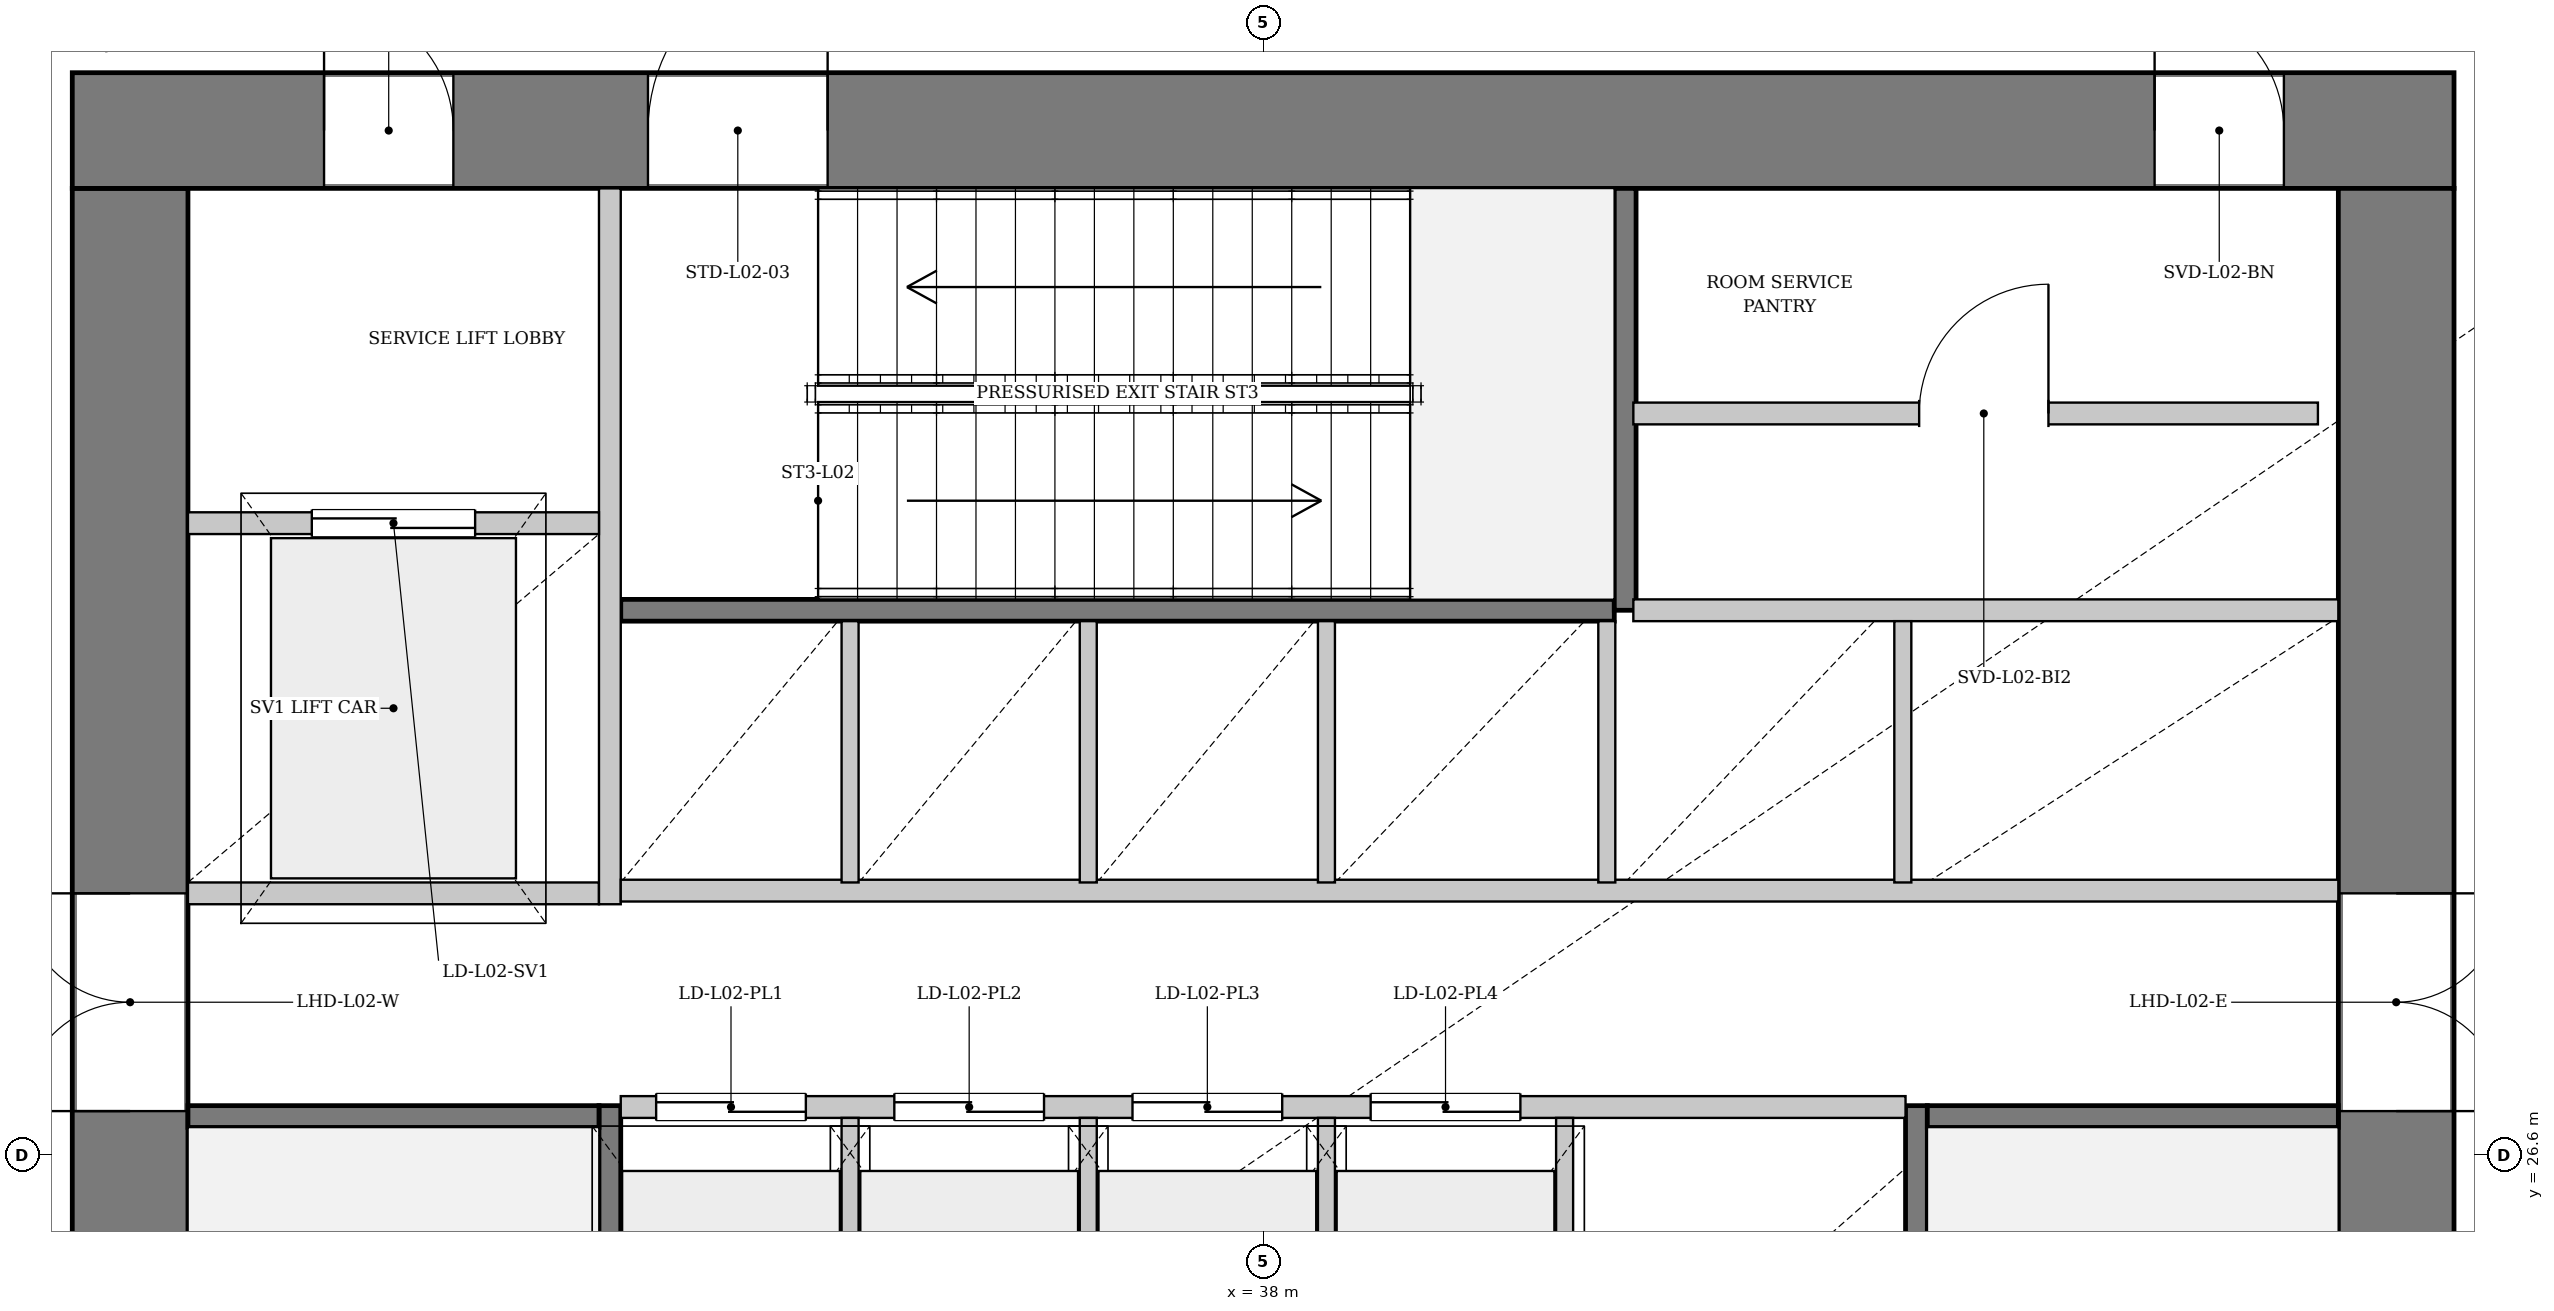
"""IFC4 building model, lengths in metres.
Left out: names, types, materials, properties, quantities, classifications, styles, units other than length and angle.
Written with IfcOpenShell. Run it as: python <this file> out.ifc"""

import sys

from ifc_helpers import new_model, si_unit, direction, frame, frame_2d, origin, place, context, subcontext, project, spatial, rectangle, extrude, source, transform, mapped, element, fill, save


model = new_model("IFC4")
c1 = context("Model", 3, precision=1e-05, world=origin(), true_north=direction((0.0, 1.0)))
c2 = subcontext(c1, "Body", "Model", "MODEL_VIEW")
j1 = project(units=[si_unit("LENGTHUNIT", "METRE"), si_unit("PLANEANGLEUNIT", "RADIAN")], contexts=[c1])
p1 = place(None, origin())
s1 = spatial("IfcSite", under=j1, at=p1, CompositionType="ELEMENT")
p2 = place(p1, origin())
s2 = spatial("IfcBuilding", under=s1, at=p2, CompositionType="ELEMENT")
p3 = place(p2, frame((0.0, 0.0, 10.2)))
s3 = spatial("IfcBuildingStorey", under=s2, at=p3, CompositionType="ELEMENT", Elevation=10.2)
p4 = place(p3, frame((29.675, 19.5, 0.0), z_axis=(0.0, 0.0, 1.0), x_axis=(0.0, 1.0, 0.0)))
e1 = element("IfcWall", 1, at=p4, inside=s3, PredefinedType="SHEAR", context=c2, shape_type="SweptSolid", body=[
    extrude(rectangle(XDim=14.2, YDim=0.85, at=frame_2d((7.1, 0.0))), origin(), (0.0, 0.0, 1.0), 5.08),
])
p5 = place(p4, frame((7.42, 0.0, 0.0)))
e2 = element("IfcOpeningElement", 2, at=p5, cuts=e1, PredefinedType="OPENING", context=c2, shape_type="SweptSolid", body=[
    extrude(rectangle(XDim=1.6, YDim=2.2, at=frame_2d((0.8, 1.1))), frame((0.0, 0.435, 0.0), z_axis=(0.0, -1.0, 0.0), x_axis=(1.0, 0.0, 0.0)), (0.0, 0.0, 1.0), 0.87),
])
p6 = place(p3, frame((29.25, 34.125, 0.0), z_axis=(0.0, 0.0, 1.0), x_axis=(1.0, 0.0, 0.0)))
e3 = element("IfcWall", 3, at=p6, inside=s3, PredefinedType="SHEAR", context=c2, shape_type="SweptSolid", body=[
    extrude(rectangle(XDim=17.5, YDim=0.85, at=frame_2d((8.75, 0.0))), origin(), (0.0, 0.0, 1.0), 5.08),
])
p7 = place(p6, frame((1.85, 0.0, 0.0)))
e4 = element("IfcOpeningElement", 4, at=p7, cuts=e3, PredefinedType="OPENING", context=c2, shape_type="SweptSolid", body=[
    extrude(rectangle(XDim=0.95, YDim=2.1, at=frame_2d((0.475, 1.05))), frame((0.0, 0.435, 0.0), z_axis=(0.0, -1.0, 0.0), x_axis=(1.0, 0.0, 0.0)), (0.0, 0.0, 1.0), 0.87),
])
p8 = place(p6, frame((4.23, 0.0, 0.0)))
e5 = element("IfcOpeningElement", 5, at=p8, cuts=e3, PredefinedType="OPENING", context=c2, shape_type="SweptSolid", body=[
    extrude(rectangle(XDim=1.32, YDim=2.2, at=frame_2d((0.66, 1.1))), frame((0.0, 0.435, 0.0), z_axis=(0.0, -1.0, 0.0), x_axis=(1.0, 0.0, 0.0)), (0.0, 0.0, 1.0), 0.87),
])
p9 = place(p6, frame((15.3, 0.0, 0.0)))
e6 = element("IfcOpeningElement", 6, at=p9, cuts=e3, PredefinedType="OPENING", context=c2, shape_type="SweptSolid", body=[
    extrude(rectangle(XDim=0.95, YDim=2.1, at=frame_2d((0.475, 1.05))), frame((0.0, 0.435, 0.0), z_axis=(0.0, -1.0, 0.0), x_axis=(1.0, 0.0, 0.0)), (0.0, 0.0, 1.0), 0.87),
])
p10 = place(p3, frame((46.325, 33.7, 0.0), z_axis=(0.0, 0.0, 1.0), x_axis=(0.0, -1.0, 0.0)))
e7 = element("IfcWall", 7, at=p10, inside=s3, PredefinedType="SHEAR", context=c2, shape_type="SweptSolid", body=[
    extrude(rectangle(XDim=14.2, YDim=0.85, at=frame_2d((7.1, 0.0))), origin(), (0.0, 0.0, 1.0), 5.08),
])
p11 = place(p10, frame((5.18, 0.0, 0.0)))
e8 = element("IfcOpeningElement", 8, at=p11, cuts=e7, PredefinedType="OPENING", context=c2, shape_type="SweptSolid", body=[
    extrude(rectangle(XDim=1.6, YDim=2.2, at=frame_2d((0.8, 1.1))), frame((0.0, 0.435, 0.0), z_axis=(0.0, -1.0, 0.0), x_axis=(1.0, 0.0, 0.0)), (0.0, 0.0, 1.0), 0.87),
])
p12 = place(p3, frame((33.2, 19.5, 0.0), z_axis=(0.0, 0.0, 1.0), x_axis=(0.0, 1.0, 0.0)))
e9 = element("IfcWall", 9, at=p12, inside=s3, PredefinedType="PARTITIONING", context=c2, shape_type="SweptSolid", body=[
    extrude(rectangle(XDim=7.46, YDim=0.16, at=frame_2d((3.73, 0.0))), origin(), (0.0, 0.0, 1.0), 5.08),
])
p13 = place(p12, frame((0.08, 0.0, 0.0)))
e10 = element("IfcOpeningElement", 10, at=p13, cuts=e9, PredefinedType="OPENING", context=c2, shape_type="SweptSolid", body=[
    extrude(rectangle(XDim=1.32, YDim=2.2, at=frame_2d((0.66, 1.1))), frame((0.0, 0.09, 0.0), z_axis=(0.0, -1.0, 0.0), x_axis=(1.0, 0.0, 0.0)), (0.0, 0.0, 1.0), 0.18),
])
p14 = place(p3, frame((30.1, 26.88, 0.0), z_axis=(0.0, 0.0, 1.0), x_axis=(1.0, 0.0, 0.0)))
e11 = element("IfcWall", 11, at=p14, inside=s3, PredefinedType="PARTITIONING", context=c2, shape_type="SweptSolid", body=[
    extrude(rectangle(XDim=3.02, YDim=0.16, at=frame_2d((1.51, 0.0))), origin(), (0.0, 0.0, 1.0), 5.08),
])
p15 = place(p3, frame((42.8, 26.96, 0.0), z_axis=(0.0, 0.0, 1.0), x_axis=(0.0, -1.0, 0.0)))
e12 = element("IfcWall", 12, at=p15, inside=s3, PredefinedType="PARTITIONING", context=c2, shape_type="SweptSolid", body=[
    extrude(rectangle(XDim=7.46, YDim=0.16, at=frame_2d((3.73, 0.0))), origin(), (0.0, 0.0, 1.0), 5.08),
])
p16 = place(p15, frame((6.06, 0.0, 0.0)))
e13 = element("IfcOpeningElement", 13, at=p16, cuts=e12, PredefinedType="OPENING", context=c2, shape_type="SweptSolid", body=[
    extrude(rectangle(XDim=1.32, YDim=2.2, at=frame_2d((0.66, 1.1))), frame((0.0, 0.09, 0.0), z_axis=(0.0, -1.0, 0.0), x_axis=(1.0, 0.0, 0.0)), (0.0, 0.0, 1.0), 0.18),
])
p17 = place(p3, frame((42.88, 26.88, 0.0), z_axis=(0.0, 0.0, 1.0), x_axis=(1.0, 0.0, 0.0)))
e14 = element("IfcWall", 14, at=p17, inside=s3, PredefinedType="PARTITIONING", context=c2, shape_type="SweptSolid", body=[
    extrude(rectangle(XDim=3.02, YDim=0.16, at=frame_2d((1.51, 0.0))), origin(), (0.0, 0.0, 1.0), 5.08),
])
p18 = place(p3, frame((33.28, 30.6, 0.0), z_axis=(0.0, 0.0, 1.0), x_axis=(1.0, 0.0, 0.0)))
e15 = element("IfcWall", 15, at=p18, inside=s3, PredefinedType="PARTITIONING", context=c2, shape_type="SweptSolid", body=[
    extrude(rectangle(XDim=7.3, YDim=0.16, at=frame_2d((3.65, 0.0))), origin(), (0.0, 0.0, 1.0), 5.08),
])
p19 = place(p3, frame((40.66, 30.6, 0.0), z_axis=(0.0, 0.0, 1.0), x_axis=(0.0, 1.0, 0.0)))
e16 = element("IfcWall", 16, at=p19, inside=s3, PredefinedType="PARTITIONING", context=c2, shape_type="SweptSolid", body=[
    extrude(rectangle(XDim=3.1, YDim=0.16, at=frame_2d((1.55, 0.0))), origin(), (0.0, 0.0, 1.0), 5.08),
])
p20 = place(p3, frame((30.1, 28.52, 0.0), z_axis=(0.0, 0.0, 1.0), x_axis=(1.0, 0.0, 0.0)))
e17 = element("IfcWall", 17, at=p20, inside=s3, PredefinedType="PARTITIONING", context=c2, shape_type="SweptSolid", body=[
    extrude(rectangle(XDim=3.02, YDim=0.16, at=frame_2d((1.51, 0.0))), origin(), (0.0, 0.0, 1.0), 5.08),
])
p21 = place(p3, frame((33.2, 28.44, 0.0), z_axis=(0.0, 0.0, 1.0), x_axis=(0.0, 1.0, 0.0)))
e18 = element("IfcWall", 18, at=p21, inside=s3, PredefinedType="PARTITIONING", context=c2, shape_type="SweptSolid", body=[
    extrude(rectangle(XDim=5.26, YDim=0.16, at=frame_2d((2.63, 0.0))), origin(), (0.0, 0.0, 1.0), 5.08),
])
p22 = place(p3, frame((30.1, 31.24, 0.0), z_axis=(0.0, 0.0, 1.0), x_axis=(1.0, 0.0, 0.0)))
e19 = element("IfcWall", 19, at=p22, inside=s3, PredefinedType="PARTITIONING", context=c2, shape_type="SweptSolid", body=[
    extrude(rectangle(XDim=3.02, YDim=0.16, at=frame_2d((1.51, 0.0))), origin(), (0.0, 0.0, 1.0), 5.08),
])
p23 = place(p22, frame((0.91, 0.0, 0.0)))
e20 = element("IfcOpeningElement", 20, at=p23, cuts=e19, PredefinedType="OPENING", context=c2, shape_type="SweptSolid", body=[
    extrude(rectangle(XDim=1.2, YDim=2.2, at=frame_2d((0.6, 1.1))), frame((0.0, 0.09, 0.0), z_axis=(0.0, -1.0, 0.0), x_axis=(1.0, 0.0, 0.0)), (0.0, 0.0, 1.0), 0.18),
])
p24 = place(p3, frame((33.28, 26.95, 0.0), z_axis=(0.0, 0.0, 1.0), x_axis=(1.0, 0.0, 0.0)))
e21 = element("IfcWall", 21, at=p24, inside=s3, PredefinedType="PARTITIONING", context=c2, shape_type="SweptSolid", body=[
    extrude(rectangle(XDim=9.44, YDim=0.16, at=frame_2d((4.72, 0.0))), origin(), (0.0, 0.0, 1.0), 5.08),
])
p25 = place(p24, frame((0.26, 0.0, 0.0)))
e22 = element("IfcOpeningElement", 22, at=p25, cuts=e21, PredefinedType="OPENING", context=c2, shape_type="SweptSolid", body=[
    extrude(rectangle(XDim=1.1, YDim=2.2, at=frame_2d((0.55, 1.1))), frame((0.0, 0.09, 0.0), z_axis=(0.0, -1.0, 0.0), x_axis=(1.0, 0.0, 0.0)), (0.0, 0.0, 1.0), 0.18),
])
p26 = place(p24, frame((2.01, 0.0, 0.0)))
e23 = element("IfcOpeningElement", 23, at=p26, cuts=e21, PredefinedType="OPENING", context=c2, shape_type="SweptSolid", body=[
    extrude(rectangle(XDim=1.1, YDim=2.2, at=frame_2d((0.55, 1.1))), frame((0.0, 0.09, 0.0), z_axis=(0.0, -1.0, 0.0), x_axis=(1.0, 0.0, 0.0)), (0.0, 0.0, 1.0), 0.18),
])
p27 = place(p24, frame((3.76, 0.0, 0.0)))
e24 = element("IfcOpeningElement", 24, at=p27, cuts=e21, PredefinedType="OPENING", context=c2, shape_type="SweptSolid", body=[
    extrude(rectangle(XDim=1.1, YDim=2.2, at=frame_2d((0.55, 1.1))), frame((0.0, 0.09, 0.0), z_axis=(0.0, -1.0, 0.0), x_axis=(1.0, 0.0, 0.0)), (0.0, 0.0, 1.0), 0.18),
])
p28 = place(p24, frame((5.51, 0.0, 0.0)))
e25 = element("IfcOpeningElement", 25, at=p28, cuts=e21, PredefinedType="OPENING", context=c2, shape_type="SweptSolid", body=[
    extrude(rectangle(XDim=1.1, YDim=2.2, at=frame_2d((0.55, 1.1))), frame((0.0, 0.09, 0.0), z_axis=(0.0, -1.0, 0.0), x_axis=(1.0, 0.0, 0.0)), (0.0, 0.0, 1.0), 0.18),
])
for number, where, z_axis, x_axis in (
    (26, (34.965, 24.56, 0.0), (0.0, 0.0, 1.0), (0.0, 1.0, 0.0)),
    (27, (36.715, 24.56, 0.0), (0.0, 0.0, 1.0), (0.0, 1.0, 0.0)),
    (28, (38.465, 24.56, 0.0), (0.0, 0.0, 1.0), (0.0, 1.0, 0.0)),
    (29, (40.215, 24.56, 0.0), (0.0, 0.0, 1.0), (0.0, 1.0, 0.0)),
):
    element("IfcWall", number, at=place(p3, frame(where, z_axis=z_axis, x_axis=x_axis)), inside=s3, PredefinedType="PARTITIONING", context=c2, shape_type="SweptSolid", body=[
        extrude(rectangle(XDim=2.31, YDim=0.125, at=frame_2d((1.155, 0.0))), origin(), (0.0, 0.0, 1.0), 5.08),
    ])
p29 = place(p3, frame((33.28, 28.54, 0.0), z_axis=(0.0, 0.0, 1.0), x_axis=(1.0, 0.0, 0.0)))
e30 = element("IfcWall", 30, at=p29, inside=s3, PredefinedType="PARTITIONING", context=c2, shape_type="SweptSolid", body=[
    extrude(rectangle(XDim=12.62, YDim=0.16, at=frame_2d((6.31, 0.0))), origin(), (0.0, 0.0, 1.0), 5.08),
])
p30 = place(p3, frame((40.72, 30.6, 0.0), z_axis=(0.0, 0.0, 1.0), x_axis=(1.0, 0.0, 0.0)))
e31 = element("IfcWall", 31, at=p30, inside=s3, PredefinedType="PARTITIONING", context=c2, shape_type="SweptSolid", body=[
    extrude(rectangle(XDim=5.18, YDim=0.16, at=frame_2d((2.59, 0.0))), origin(), (0.0, 0.0, 1.0), 5.08),
])
for number, where, z_axis, x_axis in (
    (32, (34.965, 28.6, 0.0), (0.0, 0.0, 1.0), (0.0, 1.0, 0.0)),
    (33, (36.715, 28.6, 0.0), (0.0, 0.0, 1.0), (0.0, 1.0, 0.0)),
    (34, (38.465, 28.6, 0.0), (0.0, 0.0, 1.0), (0.0, 1.0, 0.0)),
    (35, (40.525, 28.6, 0.0), (0.0, 0.0, 1.0), (0.0, 1.0, 0.0)),
    (36, (42.7, 28.6, 0.0), (0.0, 0.0, 1.0), (0.0, 1.0, 0.0)),
):
    element("IfcWall", number, at=place(p3, frame(where, z_axis=z_axis, x_axis=x_axis)), inside=s3, PredefinedType="PARTITIONING", context=c2, shape_type="SweptSolid", body=[
        extrude(rectangle(XDim=1.92, YDim=0.125, at=frame_2d((0.96, 0.0))), origin(), (0.0, 0.0, 1.0), 5.08),
    ])
p31 = place(p3, frame((40.72, 32.046, 0.0), z_axis=(0.0, 0.0, 1.0), x_axis=(1.0, 0.0, 0.0)))
e37 = element("IfcWall", 37, at=p31, inside=s3, PredefinedType="PARTITIONING", context=c2, shape_type="SweptSolid", body=[
    extrude(rectangle(XDim=5.03, YDim=0.16, at=frame_2d((2.515, 0.0))), origin(), (0.0, 0.0, 1.0), 5.08),
])
p32 = place(p31, frame((2.1, 0.0, 0.0)))
e38 = element("IfcOpeningElement", 38, at=p32, cuts=e37, PredefinedType="OPENING", context=c2, shape_type="SweptSolid", body=[
    extrude(rectangle(XDim=0.95, YDim=2.1, at=frame_2d((0.475, 1.05))), frame((0.0, 0.09, 0.0), z_axis=(0.0, -1.0, 0.0), x_axis=(1.0, 0.0, 0.0)), (0.0, 0.0, 1.0), 0.18),
])
m1 = source(origin(), c2, "Body", "SweptSolid", [
    extrude(rectangle(XDim=1.6, YDim=2.2, at=frame_2d((0.8, 1.1))), frame((0.0, 0.025, 0.0), z_axis=(0.0, -1.0, 0.0), x_axis=(1.0, 0.0, 0.0)), (0.0, 0.0, 1.0), 0.05),
])
p33 = place(p5, origin())
e39 = element("IfcDoor", 39, at=p33, inside=s3, OperationType="DOUBLE_DOOR_SINGLE_SWING", PredefinedType="DOOR", context=c2, shape_type="MappedRepresentation", body=[
    mapped(m1, transform((0.0, 0.0, 0.0), x_axis=(1.0, 0.0, 0.0), y_axis=(0.0, 1.0, 0.0), z_axis=(0.0, 0.0, 1.0), scale=1.0)),
])
fill(e2, e39)
m2 = source(origin(), c2, "Body", "SweptSolid", [
    extrude(rectangle(XDim=0.95, YDim=2.1, at=frame_2d((0.475, 1.05))), frame((0.0, 0.025, 0.0), z_axis=(0.0, -1.0, 0.0), x_axis=(1.0, 0.0, 0.0)), (0.0, 0.0, 1.0), 0.05),
])
p34 = place(p7, origin())
e40 = element("IfcDoor", 40, at=p34, inside=s3, OperationType="SINGLE_SWING_LEFT", PredefinedType="DOOR", context=c2, shape_type="MappedRepresentation", body=[
    mapped(m2, transform((0.0, 0.0, 0.0), x_axis=(1.0, 0.0, 0.0), y_axis=(0.0, 1.0, 0.0), z_axis=(0.0, 0.0, 1.0), scale=1.0)),
])
fill(e4, e40)
m3 = source(origin(), c2, "Body", "SweptSolid", [
    extrude(rectangle(XDim=1.32, YDim=2.2, at=frame_2d((0.66, 1.1))), frame((0.0, 0.025, 0.0), z_axis=(0.0, -1.0, 0.0), x_axis=(1.0, 0.0, 0.0)), (0.0, 0.0, 1.0), 0.05),
])
p35 = place(p8, origin())
e41 = element("IfcDoor", 41, at=p35, inside=s3, OperationType="SINGLE_SWING_RIGHT", PredefinedType="DOOR", context=c2, shape_type="MappedRepresentation", body=[
    mapped(m3, transform((0.0, 0.0, 0.0), x_axis=(1.0, 0.0, 0.0), y_axis=(0.0, 1.0, 0.0), z_axis=(0.0, 0.0, 1.0), scale=1.0)),
])
fill(e5, e41)
p36 = place(p11, origin())
e42 = element("IfcDoor", 42, at=p36, inside=s3, OperationType="DOUBLE_DOOR_SINGLE_SWING", PredefinedType="DOOR", context=c2, shape_type="MappedRepresentation", body=[
    mapped(m1, transform((0.0, 0.0, 0.0), x_axis=(1.0, 0.0, 0.0), y_axis=(0.0, 1.0, 0.0), z_axis=(0.0, 0.0, 1.0), scale=1.0)),
])
fill(e8, e42)
m4 = source(origin(), c2, "Body", "SweptSolid", [
    extrude(rectangle(XDim=1.2, YDim=2.2, at=frame_2d((0.6, 1.1))), frame((0.0, 0.025, 0.0), z_axis=(0.0, -1.0, 0.0), x_axis=(1.0, 0.0, 0.0)), (0.0, 0.0, 1.0), 0.05),
])
p37 = place(p23, origin())
e43 = element("IfcDoor", 43, at=p37, inside=s3, OperationType="DOUBLE_DOOR_SLIDING", PredefinedType="DOOR", context=c2, shape_type="MappedRepresentation", body=[
    mapped(m4, transform((0.0, 0.0, 0.0), x_axis=(1.0, 0.0, 0.0), y_axis=(0.0, 1.0, 0.0), z_axis=(0.0, 0.0, 1.0), scale=1.0)),
])
fill(e20, e43)
m5 = source(origin(), c2, "Body", "SweptSolid", [
    extrude(rectangle(XDim=1.1, YDim=2.2, at=frame_2d((0.55, 1.1))), frame((0.0, 0.025, 0.0), z_axis=(0.0, -1.0, 0.0), x_axis=(1.0, 0.0, 0.0)), (0.0, 0.0, 1.0), 0.05),
])
p38 = place(p25, origin())
e44 = element("IfcDoor", 44, at=p38, inside=s3, OperationType="DOUBLE_DOOR_SLIDING", PredefinedType="DOOR", context=c2, shape_type="MappedRepresentation", body=[
    mapped(m5, transform((0.0, 0.0, 0.0), x_axis=(1.0, 0.0, 0.0), y_axis=(0.0, 1.0, 0.0), z_axis=(0.0, 0.0, 1.0), scale=1.0)),
])
fill(e22, e44)
p39 = place(p26, origin())
e45 = element("IfcDoor", 45, at=p39, inside=s3, OperationType="DOUBLE_DOOR_SLIDING", PredefinedType="DOOR", context=c2, shape_type="MappedRepresentation", body=[
    mapped(m5, transform((0.0, 0.0, 0.0), x_axis=(1.0, 0.0, 0.0), y_axis=(0.0, 1.0, 0.0), z_axis=(0.0, 0.0, 1.0), scale=1.0)),
])
fill(e23, e45)
p40 = place(p27, origin())
e46 = element("IfcDoor", 46, at=p40, inside=s3, OperationType="DOUBLE_DOOR_SLIDING", PredefinedType="DOOR", context=c2, shape_type="MappedRepresentation", body=[
    mapped(m5, transform((0.0, 0.0, 0.0), x_axis=(1.0, 0.0, 0.0), y_axis=(0.0, 1.0, 0.0), z_axis=(0.0, 0.0, 1.0), scale=1.0)),
])
fill(e24, e46)
p41 = place(p28, origin())
e47 = element("IfcDoor", 47, at=p41, inside=s3, OperationType="DOUBLE_DOOR_SLIDING", PredefinedType="DOOR", context=c2, shape_type="MappedRepresentation", body=[
    mapped(m5, transform((0.0, 0.0, 0.0), x_axis=(1.0, 0.0, 0.0), y_axis=(0.0, 1.0, 0.0), z_axis=(0.0, 0.0, 1.0), scale=1.0)),
])
fill(e25, e47)
p42 = place(p32, origin())
e48 = element("IfcDoor", 48, at=p42, inside=s3, OperationType="SINGLE_SWING_RIGHT", PredefinedType="DOOR", context=c2, shape_type="MappedRepresentation", body=[
    mapped(m2, transform((0.0, 0.0, 0.0), x_axis=(1.0, 0.0, 0.0), y_axis=(0.0, 1.0, 0.0), z_axis=(0.0, 0.0, 1.0), scale=1.0)),
])
fill(e38, e48)
p43 = place(p9, origin())
e49 = element("IfcDoor", 49, at=p43, inside=s3, OperationType="SINGLE_SWING_LEFT", PredefinedType="DOOR", context=c2, shape_type="MappedRepresentation", body=[
    mapped(m2, transform((0.0, 0.0, 0.0), x_axis=(1.0, 0.0, 0.0), y_axis=(0.0, 1.0, 0.0), z_axis=(0.0, 0.0, 1.0), scale=1.0)),
])
fill(e6, e49)
save(model, sys.argv[1])
